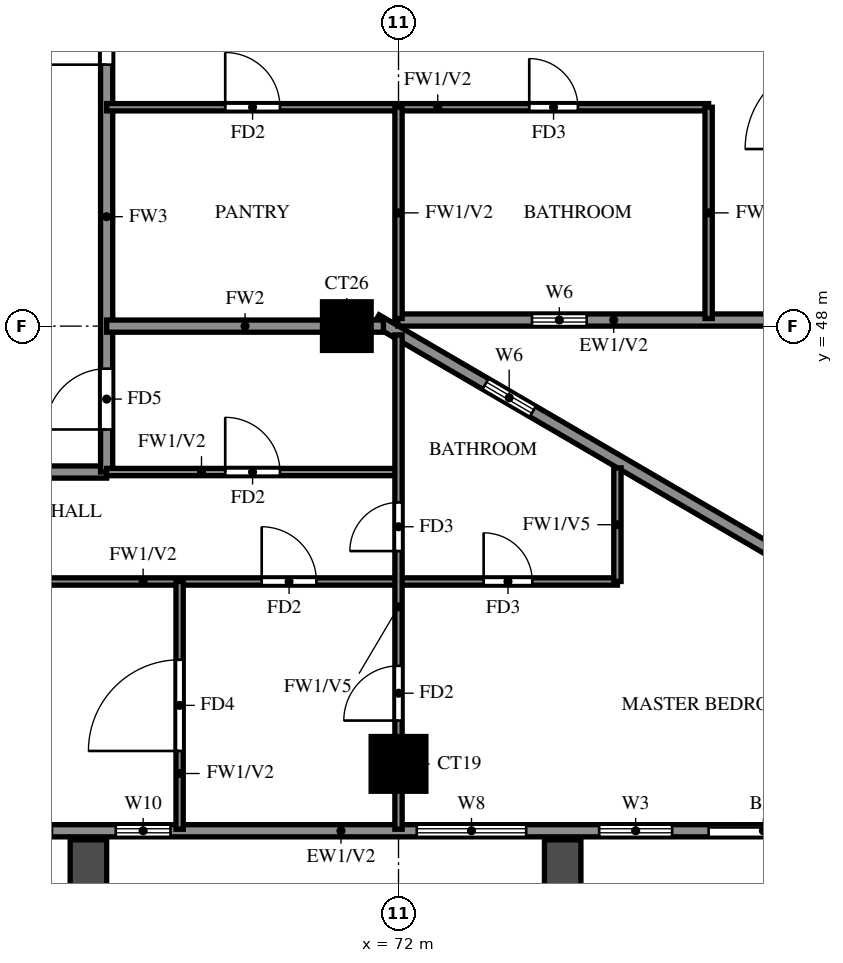
"""IFC4 building model, lengths in metres.
Left out: names, types, materials, properties, quantities, classifications, styles, units other than length and angle.
Written with IfcOpenShell. Run it as: python <this file> out.ifc"""

import sys

from ifc_helpers import new_model, si_unit, direction, frame, frame_2d, origin, origin_2d, place, context, subcontext, project, spatial, rectangle, extrude, source, transform, mapped, element, fill, save


model = new_model("IFC4")
c1 = context("Model", 3, precision=1e-05, world=origin(), true_north=direction((0.0, 1.0)))
c2 = subcontext(c1, "Body", "Model", "MODEL_VIEW")
j1 = project(units=[si_unit("LENGTHUNIT", "METRE"), si_unit("PLANEANGLEUNIT", "RADIAN")], contexts=[c1])
p1 = place(None, origin())
s1 = spatial("IfcSite", under=j1, at=p1, CompositionType="ELEMENT")
p2 = place(p1, origin())
s2 = spatial("IfcBuilding", under=s1, at=p2, CompositionType="ELEMENT")
p3 = place(p2, frame((0.0, 0.0, 174.5)))
s3 = spatial("IfcBuildingStorey", under=s2, at=p3, CompositionType="ELEMENT", Elevation=174.5)
m1 = source(origin(), c2, "Body", "SweptSolid", [
    extrude(rectangle(XDim=0.9, YDim=0.9, at=origin_2d()), origin(), (0.0, 0.0, 1.0), 3.2),
])
p4 = place(p3, frame((72.0, 40.8, 0.0), z_axis=(0.0, 0.0, 1.0), x_axis=(1.0, 0.0, 0.0)))
e1 = element("IfcColumn", 1, at=p4, inside=s3, PredefinedType="COLUMN", context=c2, shape_type="MappedRepresentation", body=[
    mapped(m1, transform((0.0, 0.0, 0.0))),
])
m2 = source(origin(), c2, "Body", "SweptSolid", [
    extrude(rectangle(XDim=0.8, YDim=0.8, at=origin_2d()), origin(), (0.0, 0.0, 1.0), 3.2),
])
p5 = place(p3, frame((71.15, 48.0, 0.0), z_axis=(0.0, 0.0, 1.0), x_axis=(1.0, 0.0, 0.0)))
e2 = element("IfcColumn", 2, at=p5, inside=s3, PredefinedType="COLUMN", context=c2, shape_type="MappedRepresentation", body=[
    mapped(m2, transform((0.0, 0.0, 0.0))),
])
p6 = place(p3, frame((85.719, 39.881, 0.0), z_axis=(0.0, 0.0, 1.0), x_axis=(-0.86377618652, 0.503875678716, 0.0)))
e3 = element("IfcWall", 3, at=p6, inside=s3, PredefinedType="SOLIDWALL", context=c2, shape_type="SweptSolid", body=[
    extrude(rectangle(XDim=16.311, YDim=0.2, at=frame_2d((8.156, 0.0))), origin(), (0.0, 0.0, 1.0), 3.2),
])
p7 = place(p6, frame((13.326, 0.0, 1.5)))
e4 = element("IfcOpeningElement", 4, at=p7, cuts=e3, PredefinedType="OPENING", context=c2, shape_type="SweptSolid", body=[
    extrude(rectangle(XDim=0.9, YDim=0.9, at=frame_2d((0.45, 0.45))), frame((0.0, 0.11, 0.0), z_axis=(0.0, -1.0, 0.0), x_axis=(1.0, 0.0, 0.0)), (0.0, 0.0, 1.0), 0.22),
])
p8 = place(p3, frame((71.99, 48.1, 0.0), z_axis=(0.0, 0.0, 1.0), x_axis=(1.0, 0.0, 0.0)))
e5 = element("IfcWall", 5, at=p8, inside=s3, PredefinedType="SOLIDWALL", context=c2, shape_type="SweptSolid", body=[
    extrude(rectangle(XDim=6.76, YDim=0.2, at=frame_2d((3.38, 0.0))), origin(), (0.0, 0.0, 1.0), 3.2),
])
p9 = place(p8, frame((2.205, 0.0, 1.5)))
e6 = element("IfcOpeningElement", 6, at=p9, cuts=e5, PredefinedType="OPENING", context=c2, shape_type="SweptSolid", body=[
    extrude(rectangle(XDim=0.9, YDim=0.9, at=frame_2d((0.45, 0.45))), frame((0.0, 0.11, 0.0), z_axis=(0.0, -1.0, 0.0), x_axis=(1.0, 0.0, 0.0)), (0.0, 0.0, 1.0), 0.22),
])
p10 = place(p3, frame((58.8, 39.7, 0.0), z_axis=(0.0, 0.0, 1.0), x_axis=(1.0, 0.0, 0.0)))
e7 = element("IfcWall", 7, at=p10, inside=s3, PredefinedType="SOLIDWALL", context=c2, shape_type="SweptSolid", body=[
    extrude(rectangle(XDim=27.23, YDim=0.2, at=frame_2d((13.615, 0.0))), origin(), (0.0, 0.0, 1.0), 3.2),
])
p11 = place(p10, frame((3.3, 0.0, 0.0)))
e8 = element("IfcOpeningElement", 8, at=p11, cuts=e7, PredefinedType="OPENING", context=c2, shape_type="SweptSolid", body=[
    extrude(rectangle(XDim=1.8, YDim=2.4, at=frame_2d((0.9, 1.2))), frame((0.0, 0.11, 0.0), z_axis=(0.0, -1.0, 0.0), x_axis=(1.0, 0.0, 0.0)), (0.0, 0.0, 1.0), 0.22),
])
p12 = place(p10, frame((18.3, 0.0, 0.0)))
e9 = element("IfcOpeningElement", 9, at=p12, cuts=e7, PredefinedType="OPENING", context=c2, shape_type="SweptSolid", body=[
    extrude(rectangle(XDim=1.8, YDim=2.4, at=frame_2d((0.9, 1.2))), frame((0.0, 0.11, 0.0), z_axis=(0.0, -1.0, 0.0), x_axis=(1.0, 0.0, 0.0)), (0.0, 0.0, 1.0), 0.22),
])
p13 = place(p10, frame((1.95, 0.0, 0.6)))
e10 = element("IfcOpeningElement", 10, at=p13, cuts=e7, PredefinedType="OPENING", context=c2, shape_type="SweptSolid", body=[
    extrude(rectangle(XDim=0.9, YDim=2.4, at=frame_2d((0.45, 1.2))), frame((0.0, 0.11, 0.0), z_axis=(0.0, -1.0, 0.0), x_axis=(1.0, 0.0, 0.0)), (0.0, 0.0, 1.0), 0.22),
])
p14 = place(p10, frame((5.7, 0.0, 0.6)))
e11 = element("IfcOpeningElement", 11, at=p14, cuts=e7, PredefinedType="OPENING", context=c2, shape_type="SweptSolid", body=[
    extrude(rectangle(XDim=1.8, YDim=2.4, at=frame_2d((0.9, 1.2))), frame((0.0, 0.11, 0.0), z_axis=(0.0, -1.0, 0.0), x_axis=(1.0, 0.0, 0.0)), (0.0, 0.0, 1.0), 0.22),
])
p15 = place(p10, frame((8.55, 0.0, 0.6)))
e12 = element("IfcOpeningElement", 12, at=p15, cuts=e7, PredefinedType="OPENING", context=c2, shape_type="SweptSolid", body=[
    extrude(rectangle(XDim=0.9, YDim=2.4, at=frame_2d((0.45, 1.2))), frame((0.0, 0.11, 0.0), z_axis=(0.0, -1.0, 0.0), x_axis=(1.0, 0.0, 0.0)), (0.0, 0.0, 1.0), 0.22),
])
p16 = place(p10, frame((13.5, 0.0, 0.6)))
e13 = element("IfcOpeningElement", 13, at=p16, cuts=e7, PredefinedType="OPENING", context=c2, shape_type="SweptSolid", body=[
    extrude(rectangle(XDim=1.8, YDim=2.4, at=frame_2d((0.9, 1.2))), frame((0.0, 0.11, 0.0), z_axis=(0.0, -1.0, 0.0), x_axis=(1.0, 0.0, 0.0)), (0.0, 0.0, 1.0), 0.22),
])
p17 = place(p10, frame((16.5, 0.0, 0.6)))
e14 = element("IfcOpeningElement", 14, at=p17, cuts=e7, PredefinedType="OPENING", context=c2, shape_type="SweptSolid", body=[
    extrude(rectangle(XDim=1.2, YDim=2.4, at=frame_2d((0.6, 1.2))), frame((0.0, 0.11, 0.0), z_axis=(0.0, -1.0, 0.0), x_axis=(1.0, 0.0, 0.0)), (0.0, 0.0, 1.0), 0.22),
])
p18 = place(p10, frame((20.7, 0.0, 0.6)))
e15 = element("IfcOpeningElement", 15, at=p18, cuts=e7, PredefinedType="OPENING", context=c2, shape_type="SweptSolid", body=[
    extrude(rectangle(XDim=1.2, YDim=2.4, at=frame_2d((0.6, 1.2))), frame((0.0, 0.11, 0.0), z_axis=(0.0, -1.0, 0.0), x_axis=(1.0, 0.0, 0.0)), (0.0, 0.0, 1.0), 0.22),
])
p19 = place(p10, frame((23.063, 0.0, 0.6)))
e16 = element("IfcOpeningElement", 16, at=p19, cuts=e7, PredefinedType="OPENING", context=c2, shape_type="SweptSolid", body=[
    extrude(rectangle(XDim=1.8, YDim=2.4, at=frame_2d((0.9, 1.2))), frame((0.0, 0.11, 0.0), z_axis=(0.0, -1.0, 0.0), x_axis=(1.0, 0.0, 0.0)), (0.0, 0.0, 1.0), 0.22),
])
p20 = place(p10, frame((25.978, 0.0, 0.6)))
e17 = element("IfcOpeningElement", 17, at=p20, cuts=e7, PredefinedType="OPENING", context=c2, shape_type="SweptSolid", body=[
    extrude(rectangle(XDim=0.9, YDim=2.4, at=frame_2d((0.45, 1.2))), frame((0.0, 0.11, 0.0), z_axis=(0.0, -1.0, 0.0), x_axis=(1.0, 0.0, 0.0)), (0.0, 0.0, 1.0), 0.22),
])
for number, where, z_axis, x_axis in (
    (18, (66.9, 39.55, 0.0), (0.0, 0.0, 1.0), (0.0, -1.0, 0.0)),
    (19, (74.7, 39.55, 0.0), (0.0, 0.0, 1.0), (0.0, -1.0, 0.0)),
):
    element("IfcWall", number, at=place(p3, frame(where, z_axis=z_axis, x_axis=x_axis)), inside=s3, PredefinedType="SOLIDWALL", context=c2, shape_type="SweptSolid", body=[
        extrude(rectangle(XDim=2.65, YDim=0.6, at=frame_2d((1.325, 0.0))), origin(), (0.0, 0.0, 1.0), 2.85),
    ])
p21 = place(p3, frame((60.0, 45.6, 0.0), z_axis=(0.0, 0.0, 1.0), x_axis=(1.0, 0.0, 0.0)))
e20 = element("IfcWall", 20, at=p21, inside=s3, PredefinedType="SOLIDWALL", context=c2, shape_type="SweptSolid", body=[
    extrude(rectangle(XDim=7.2, YDim=0.2, at=frame_2d((3.6, 0.0))), origin(), (0.0, 0.0, 1.0), 3.2),
])
p22 = place(p3, frame((67.2, 45.6, 0.0), z_axis=(0.0, 0.0, 1.0), x_axis=(0.0, 1.0, 0.0)))
e21 = element("IfcWall", 21, at=p22, inside=s3, PredefinedType="SOLIDWALL", context=c2, shape_type="SweptSolid", body=[
    extrude(rectangle(XDim=8.4, YDim=0.2, at=frame_2d((4.2, 0.0))), origin(), (0.0, 0.0, 1.0), 3.2),
])
p23 = place(p22, frame((6.7, 0.0, 0.0)))
e22 = element("IfcOpeningElement", 22, at=p23, cuts=e21, PredefinedType="OPENING", context=c2, shape_type="SweptSolid", body=[
    extrude(rectangle(XDim=1.0, YDim=2.1, at=frame_2d((0.5, 1.05))), frame((0.0, 0.11, 0.0), z_axis=(0.0, -1.0, 0.0), x_axis=(1.0, 0.0, 0.0)), (0.0, 0.0, 1.0), 0.22),
])
p24 = place(p22, frame((0.7, 0.0, 0.0)))
e23 = element("IfcOpeningElement", 23, at=p24, cuts=e21, PredefinedType="OPENING", context=c2, shape_type="SweptSolid", body=[
    extrude(rectangle(XDim=1.0, YDim=2.1, at=frame_2d((0.5, 1.05))), frame((0.0, 0.11, 0.0), z_axis=(0.0, -1.0, 0.0), x_axis=(1.0, 0.0, 0.0)), (0.0, 0.0, 1.0), 0.22),
])
p25 = place(p3, frame((67.2, 48.0, 0.0), z_axis=(0.0, 0.0, 1.0), x_axis=(1.0, 0.0, 0.0)))
e24 = element("IfcWall", 24, at=p25, inside=s3, PredefinedType="SOLIDWALL", context=c2, shape_type="SweptSolid", body=[
    extrude(rectangle(XDim=4.552, YDim=0.2, at=frame_2d((2.276, 0.0))), origin(), (0.0, 0.0, 1.0), 3.2),
])
p26 = place(p3, frame((60.0, 43.8, 0.0), z_axis=(0.0, 0.0, 1.0), x_axis=(1.0, 0.0, 0.0)))
e25 = element("IfcWall", 25, at=p26, inside=s3, PredefinedType="PARTITIONING", context=c2, shape_type="SweptSolid", body=[
    extrude(rectangle(XDim=15.6, YDim=0.12, at=frame_2d((7.8, 0.0))), origin(), (0.0, 0.0, 1.0), 3.2),
])
p27 = place(p26, frame((9.75, 0.0, 0.0)))
e26 = element("IfcOpeningElement", 26, at=p27, cuts=e25, PredefinedType="OPENING", context=c2, shape_type="SweptSolid", body=[
    extrude(rectangle(XDim=0.9, YDim=2.1, at=frame_2d((0.45, 1.05))), frame((0.0, 0.07, 0.0), z_axis=(0.0, -1.0, 0.0), x_axis=(1.0, 0.0, 0.0)), (0.0, 0.0, 1.0), 0.14),
])
p28 = place(p26, frame((3.45, 0.0, 0.0)))
e27 = element("IfcOpeningElement", 27, at=p28, cuts=e25, PredefinedType="OPENING", context=c2, shape_type="SweptSolid", body=[
    extrude(rectangle(XDim=1.5, YDim=2.1, at=frame_2d((0.75, 1.05))), frame((0.0, 0.07, 0.0), z_axis=(0.0, -1.0, 0.0), x_axis=(1.0, 0.0, 0.0)), (0.0, 0.0, 1.0), 0.14),
])
p29 = place(p26, frame((13.4, 0.0, 0.0)))
e28 = element("IfcOpeningElement", 28, at=p29, cuts=e25, PredefinedType="OPENING", context=c2, shape_type="SweptSolid", body=[
    extrude(rectangle(XDim=0.8, YDim=2.1, at=frame_2d((0.4, 1.05))), frame((0.0, 0.07, 0.0), z_axis=(0.0, -1.0, 0.0), x_axis=(1.0, 0.0, 0.0)), (0.0, 0.0, 1.0), 0.14),
])
p30 = place(p3, frame((67.2, 45.6, 0.0), z_axis=(0.0, 0.0, 1.0), x_axis=(1.0, 0.0, 0.0)))
e29 = element("IfcWall", 29, at=p30, inside=s3, PredefinedType="PARTITIONING", context=c2, shape_type="SweptSolid", body=[
    extrude(rectangle(XDim=4.8, YDim=0.12, at=frame_2d((2.4, 0.0))), origin(), (0.0, 0.0, 1.0), 3.2),
])
p31 = place(p30, frame((1.95, 0.0, 0.0)))
e30 = element("IfcOpeningElement", 30, at=p31, cuts=e29, PredefinedType="OPENING", context=c2, shape_type="SweptSolid", body=[
    extrude(rectangle(XDim=0.9, YDim=2.1, at=frame_2d((0.45, 1.05))), frame((0.0, 0.07, 0.0), z_axis=(0.0, -1.0, 0.0), x_axis=(1.0, 0.0, 0.0)), (0.0, 0.0, 1.0), 0.14),
])
p32 = place(p3, frame((67.2, 51.6, 0.0), z_axis=(0.0, 0.0, 1.0), x_axis=(1.0, 0.0, 0.0)))
e31 = element("IfcWall", 31, at=p32, inside=s3, PredefinedType="PARTITIONING", context=c2, shape_type="SweptSolid", body=[
    extrude(rectangle(XDim=9.9, YDim=0.12, at=frame_2d((4.95, 0.0))), origin(), (0.0, 0.0, 1.0), 3.2),
])
p33 = place(p32, frame((6.95, 0.0, 0.0)))
e32 = element("IfcOpeningElement", 32, at=p33, cuts=e31, PredefinedType="OPENING", context=c2, shape_type="SweptSolid", body=[
    extrude(rectangle(XDim=0.8, YDim=2.1, at=frame_2d((0.4, 1.05))), frame((0.0, 0.07, 0.0), z_axis=(0.0, -1.0, 0.0), x_axis=(1.0, 0.0, 0.0)), (0.0, 0.0, 1.0), 0.14),
])
p34 = place(p32, frame((1.95, 0.0, 0.0)))
e33 = element("IfcOpeningElement", 33, at=p34, cuts=e31, PredefinedType="OPENING", context=c2, shape_type="SweptSolid", body=[
    extrude(rectangle(XDim=0.9, YDim=2.1, at=frame_2d((0.45, 1.05))), frame((0.0, 0.07, 0.0), z_axis=(0.0, -1.0, 0.0), x_axis=(1.0, 0.0, 0.0)), (0.0, 0.0, 1.0), 0.14),
])
p35 = place(p3, frame((68.4, 39.725, 0.0), z_axis=(0.0, 0.0, 1.0), x_axis=(0.0, 1.0, 0.0)))
e34 = element("IfcWall", 34, at=p35, inside=s3, PredefinedType="PARTITIONING", context=c2, shape_type="SweptSolid", body=[
    extrude(rectangle(XDim=4.075, YDim=0.12, at=frame_2d((2.038, 0.0))), origin(), (0.0, 0.0, 1.0), 3.2),
])
p36 = place(p35, frame((1.288, 0.0, 0.0)))
e35 = element("IfcOpeningElement", 35, at=p36, cuts=e34, PredefinedType="OPENING", context=c2, shape_type="SweptSolid", body=[
    extrude(rectangle(XDim=1.5, YDim=2.1, at=frame_2d((0.75, 1.05))), frame((0.0, 0.07, 0.0), z_axis=(0.0, -1.0, 0.0), x_axis=(1.0, 0.0, 0.0)), (0.0, 0.0, 1.0), 0.14),
])
p37 = place(p3, frame((72.0, 39.725, 0.0), z_axis=(0.0, 0.0, 1.0), x_axis=(0.0, 1.0, 0.0)))
e36 = element("IfcWall", 36, at=p37, inside=s3, PredefinedType="PARTITIONING", context=c2, shape_type="SweptSolid", body=[
    extrude(rectangle(XDim=8.13, YDim=0.12, at=frame_2d((4.065, 0.0))), origin(), (0.0, 0.0, 1.0), 2.3),
])
p38 = place(p37, frame((1.788, 0.0, 0.0)))
e37 = element("IfcOpeningElement", 37, at=p38, cuts=e36, PredefinedType="OPENING", context=c2, shape_type="SweptSolid", body=[
    extrude(rectangle(XDim=0.9, YDim=2.1, at=frame_2d((0.45, 1.05))), frame((0.0, 0.07, 0.0), z_axis=(0.0, -1.0, 0.0), x_axis=(1.0, 0.0, 0.0)), (0.0, 0.0, 1.0), 0.14),
])
p39 = place(p37, frame((4.575, 0.0, 0.0)))
e38 = element("IfcOpeningElement", 38, at=p39, cuts=e36, PredefinedType="OPENING", context=c2, shape_type="SweptSolid", body=[
    extrude(rectangle(XDim=0.8, YDim=2.1, at=frame_2d((0.4, 1.05))), frame((0.0, 0.07, 0.0), z_axis=(0.0, -1.0, 0.0), x_axis=(1.0, 0.0, 0.0)), (0.0, 0.0, 1.0), 0.14),
])
p40 = place(p3, frame((72.0, 48.125, 0.0), z_axis=(0.0, 0.0, 1.0), x_axis=(0.0, 1.0, 0.0)))
e39 = element("IfcWall", 39, at=p40, inside=s3, PredefinedType="PARTITIONING", context=c2, shape_type="SweptSolid", body=[
    extrude(rectangle(XDim=3.475, YDim=0.12, at=frame_2d((1.738, 0.0))), origin(), (0.0, 0.0, 1.0), 3.2),
])
p41 = place(p3, frame((75.6, 43.8, 0.0), z_axis=(0.0, 0.0, 1.0), x_axis=(0.0, 1.0, 0.0)))
e40 = element("IfcWall", 40, at=p41, inside=s3, PredefinedType="PARTITIONING", context=c2, shape_type="SweptSolid", body=[
    extrude(rectangle(XDim=1.868, YDim=0.12, at=frame_2d((0.934, 0.0))), origin(), (0.0, 0.0, 1.0), 2.3),
])
p42 = place(p3, frame((77.1, 48.125, 0.0), z_axis=(0.0, 0.0, 1.0), x_axis=(0.0, 1.0, 0.0)))
e41 = element("IfcWall", 41, at=p42, inside=s3, PredefinedType="PARTITIONING", context=c2, shape_type="SweptSolid", body=[
    extrude(rectangle(XDim=3.475, YDim=0.12, at=frame_2d((1.738, 0.0))), origin(), (0.0, 0.0, 1.0), 3.2),
])
p43 = place(p7, origin())
e42 = element("IfcWindow", 42, at=p43, inside=s3, PartitioningType="SINGLE_PANEL", PredefinedType="WINDOW", context=c2, shape_type="SweptSolid", body=[
    extrude(rectangle(XDim=0.9, YDim=0.9, at=frame_2d((0.45, 0.45))), frame((0.0, 0.03, 0.0), z_axis=(0.0, -1.0, 0.0), x_axis=(1.0, 0.0, 0.0)), (0.0, 0.0, 1.0), 0.06),
])
fill(e4, e42)
p44 = place(p9, origin())
e43 = element("IfcWindow", 43, at=p44, inside=s3, PartitioningType="SINGLE_PANEL", PredefinedType="WINDOW", context=c2, shape_type="SweptSolid", body=[
    extrude(rectangle(XDim=0.9, YDim=0.9, at=frame_2d((0.45, 0.45))), frame((0.0, 0.03, 0.0), z_axis=(0.0, -1.0, 0.0), x_axis=(1.0, 0.0, 0.0)), (0.0, 0.0, 1.0), 0.06),
])
fill(e6, e43)
p45 = place(p12, origin())
e44 = element("IfcDoor", 44, at=p45, inside=s3, OperationType="DOUBLE_DOOR_SLIDING", PredefinedType="DOOR", context=c2, shape_type="SweptSolid", body=[
    extrude(rectangle(XDim=1.8, YDim=2.4, at=frame_2d((0.9, 1.2))), frame((0.0, 0.025, 0.0), z_axis=(0.0, -1.0, 0.0), x_axis=(1.0, 0.0, 0.0)), (0.0, 0.0, 1.0), 0.05),
])
fill(e9, e44)
p46 = place(p15, origin())
e45 = element("IfcWindow", 45, at=p46, inside=s3, PartitioningType="SINGLE_PANEL", PredefinedType="WINDOW", context=c2, shape_type="SweptSolid", body=[
    extrude(rectangle(XDim=0.9, YDim=2.4, at=frame_2d((0.45, 1.2))), frame((0.0, 0.03, 0.0), z_axis=(0.0, -1.0, 0.0), x_axis=(1.0, 0.0, 0.0)), (0.0, 0.0, 1.0), 0.06),
])
fill(e12, e45)
p47 = place(p16, origin())
e46 = element("IfcWindow", 46, at=p47, inside=s3, PartitioningType="DOUBLE_PANEL_VERTICAL", PredefinedType="WINDOW", context=c2, shape_type="SweptSolid", body=[
    extrude(rectangle(XDim=1.8, YDim=2.4, at=frame_2d((0.9, 1.2))), frame((0.0, 0.03, 0.0), z_axis=(0.0, -1.0, 0.0), x_axis=(1.0, 0.0, 0.0)), (0.0, 0.0, 1.0), 0.06),
])
fill(e13, e46)
p48 = place(p17, origin())
e47 = element("IfcWindow", 47, at=p48, inside=s3, PartitioningType="SINGLE_PANEL", PredefinedType="WINDOW", context=c2, shape_type="SweptSolid", body=[
    extrude(rectangle(XDim=1.2, YDim=2.4, at=frame_2d((0.6, 1.2))), frame((0.0, 0.03, 0.0), z_axis=(0.0, -1.0, 0.0), x_axis=(1.0, 0.0, 0.0)), (0.0, 0.0, 1.0), 0.06),
])
fill(e14, e47)
p49 = place(p23, origin())
e48 = element("IfcDoor", 48, at=p49, inside=s3, OperationType="SINGLE_SWING_LEFT", PredefinedType="DOOR", context=c2, shape_type="SweptSolid", body=[
    extrude(rectangle(XDim=1.0, YDim=2.1, at=frame_2d((0.5, 1.05))), frame((0.0, 0.025, 0.0), z_axis=(0.0, -1.0, 0.0), x_axis=(1.0, 0.0, 0.0)), (0.0, 0.0, 1.0), 0.05),
])
fill(e22, e48)
p50 = place(p33, origin())
e49 = element("IfcDoor", 49, at=p50, inside=s3, OperationType="SINGLE_SWING_LEFT", PredefinedType="DOOR", context=c2, shape_type="SweptSolid", body=[
    extrude(rectangle(XDim=0.8, YDim=2.1, at=frame_2d((0.4, 1.05))), frame((0.0, 0.025, 0.0), z_axis=(0.0, -1.0, 0.0), x_axis=(1.0, 0.0, 0.0)), (0.0, 0.0, 1.0), 0.05),
])
fill(e32, e49)
p51 = place(p34, origin())
e50 = element("IfcDoor", 50, at=p51, inside=s3, OperationType="SINGLE_SWING_LEFT", PredefinedType="DOOR", context=c2, shape_type="SweptSolid", body=[
    extrude(rectangle(XDim=0.9, YDim=2.1, at=frame_2d((0.45, 1.05))), frame((0.0, 0.025, 0.0), z_axis=(0.0, -1.0, 0.0), x_axis=(1.0, 0.0, 0.0)), (0.0, 0.0, 1.0), 0.05),
])
fill(e33, e50)
p52 = place(p36, origin())
e51 = element("IfcDoor", 51, at=p52, inside=s3, OperationType="SINGLE_SWING_RIGHT", PredefinedType="DOOR", context=c2, shape_type="SweptSolid", body=[
    extrude(rectangle(XDim=1.5, YDim=2.1, at=frame_2d((0.75, 1.05))), frame((0.0, 0.025, 0.0), z_axis=(0.0, -1.0, 0.0), x_axis=(1.0, 0.0, 0.0)), (0.0, 0.0, 1.0), 0.05),
])
fill(e35, e51)
p53 = place(p31, origin())
e52 = element("IfcDoor", 52, at=p53, inside=s3, OperationType="SINGLE_SWING_LEFT", PredefinedType="DOOR", context=c2, shape_type="SweptSolid", body=[
    extrude(rectangle(XDim=0.9, YDim=2.1, at=frame_2d((0.45, 1.05))), frame((0.0, 0.025, 0.0), z_axis=(0.0, -1.0, 0.0), x_axis=(1.0, 0.0, 0.0)), (0.0, 0.0, 1.0), 0.05),
])
fill(e30, e52)
p54 = place(p24, origin())
e53 = element("IfcDoor", 53, at=p54, inside=s3, OperationType="SINGLE_SWING_LEFT", PredefinedType="DOOR", context=c2, shape_type="SweptSolid", body=[
    extrude(rectangle(XDim=1.0, YDim=2.1, at=frame_2d((0.5, 1.05))), frame((0.0, 0.025, 0.0), z_axis=(0.0, -1.0, 0.0), x_axis=(1.0, 0.0, 0.0)), (0.0, 0.0, 1.0), 0.05),
])
fill(e23, e53)
p55 = place(p27, origin())
e54 = element("IfcDoor", 54, at=p55, inside=s3, OperationType="SINGLE_SWING_RIGHT", PredefinedType="DOOR", context=c2, shape_type="SweptSolid", body=[
    extrude(rectangle(XDim=0.9, YDim=2.1, at=frame_2d((0.45, 1.05))), frame((0.0, 0.025, 0.0), z_axis=(0.0, -1.0, 0.0), x_axis=(1.0, 0.0, 0.0)), (0.0, 0.0, 1.0), 0.05),
])
fill(e26, e54)
p56 = place(p38, origin())
e55 = element("IfcDoor", 55, at=p56, inside=s3, OperationType="SINGLE_SWING_RIGHT", PredefinedType="DOOR", context=c2, shape_type="SweptSolid", body=[
    extrude(rectangle(XDim=0.9, YDim=2.1, at=frame_2d((0.45, 1.05))), frame((0.0, 0.025, 0.0), z_axis=(0.0, -1.0, 0.0), x_axis=(1.0, 0.0, 0.0)), (0.0, 0.0, 1.0), 0.05),
])
fill(e37, e55)
p57 = place(p39, origin())
e56 = element("IfcDoor", 56, at=p57, inside=s3, OperationType="SINGLE_SWING_RIGHT", PredefinedType="DOOR", context=c2, shape_type="SweptSolid", body=[
    extrude(rectangle(XDim=0.8, YDim=2.1, at=frame_2d((0.4, 1.05))), frame((0.0, 0.025, 0.0), z_axis=(0.0, -1.0, 0.0), x_axis=(1.0, 0.0, 0.0)), (0.0, 0.0, 1.0), 0.05),
])
fill(e38, e56)
p58 = place(p29, origin())
e57 = element("IfcDoor", 57, at=p58, inside=s3, OperationType="SINGLE_SWING_LEFT", PredefinedType="DOOR", context=c2, shape_type="SweptSolid", body=[
    extrude(rectangle(XDim=0.8, YDim=2.1, at=frame_2d((0.4, 1.05))), frame((0.0, 0.025, 0.0), z_axis=(0.0, -1.0, 0.0), x_axis=(1.0, 0.0, 0.0)), (0.0, 0.0, 1.0), 0.05),
])
fill(e28, e57)
save(model, sys.argv[1])
